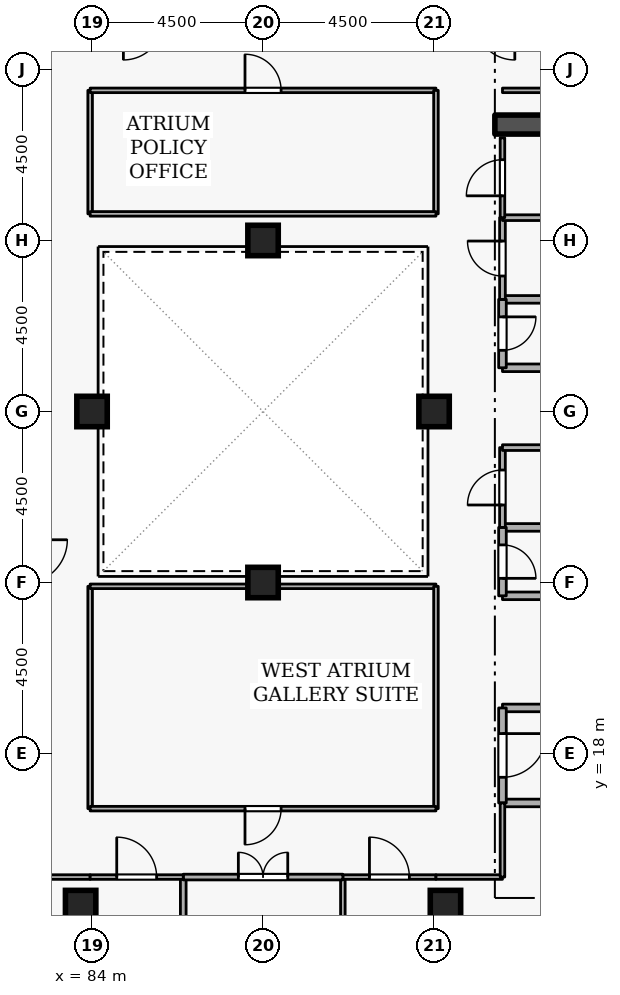
"""IFC4 building model, lengths in metres.
Left out: names, types, materials, properties, quantities, classifications, styles, units other than length and angle.
Written with IfcOpenShell. Run it as: python <this file> out.ifc"""

import sys

from ifc_helpers import new_model, si_unit, direction, frame, frame_2d, origin, origin_2d, place, context, subcontext, project, spatial, rectangle, extrude, element, fill, save


model = new_model("IFC4")
c1 = context("Model", 3, precision=1e-05, world=origin(), true_north=direction((0.0, 1.0)))
c2 = subcontext(c1, "Body", "Model", "MODEL_VIEW")
j1 = project(units=[si_unit("LENGTHUNIT", "METRE"), si_unit("PLANEANGLEUNIT", "RADIAN")], contexts=[c1])
p1 = place(None, origin())
s1 = spatial("IfcSite", under=j1, at=p1, CompositionType="ELEMENT")
p2 = place(p1, origin())
s2 = spatial("IfcBuilding", under=s1, at=p2, CompositionType="ELEMENT")
p3 = place(p2, frame((0.0, 0.0, 258.3)))
s3 = spatial("IfcBuildingStorey", under=s2, at=p3, CompositionType="ELEMENT", Elevation=258.3)
p4 = place(p3, frame((94.6, 34.55, 0.0), z_axis=(0.0, 0.0, 1.0), x_axis=(1.0, 0.0, 0.0)))
e1 = element("IfcWall", 1, at=p4, inside=s3, PredefinedType="SHEAR", context=c2, shape_type="SweptSolid", body=[
    extrude(rectangle(XDim=5.8, YDim=0.5, at=frame_2d((2.9, 0.0))), origin(), (0.0, 0.0, 1.0), 3.6),
])
for number, where, z_axis, x_axis in (
    (2, (93.3, 14.0, 0.0), (0.0, 0.0, 1.0), (1.0, 0.0, 0.0)),
    (3, (83.7, 14.0, 0.0), (0.0, 0.0, 1.0), (1.0, 0.0, 0.0)),
    (4, (93.0, 27.0, 0.0), (0.0, 0.0, 1.0), (1.0, 0.0, 0.0)),
    (5, (84.0, 27.0, 0.0), (0.0, 0.0, 1.0), (1.0, 0.0, 0.0)),
    (6, (88.5, 22.5, 0.0), (0.0, 0.0, 1.0), (1.0, 0.0, 0.0)),
    (7, (88.5, 31.5, 0.0), (0.0, 0.0, 1.0), (1.0, 0.0, 0.0)),
):
    element("IfcColumn", number, at=place(p3, frame(where, z_axis=z_axis, x_axis=x_axis)), inside=s3, PredefinedType="COLUMN", context=c2, shape_type="SweptSolid", body=[
        extrude(rectangle(XDim=0.8, YDim=0.8, at=origin_2d()), origin(), (0.0, 0.0, 1.0), 3.6),
    ])
p5 = place(p3, frame((94.8, 16.7, 0.0), z_axis=(0.0, 0.0, 1.0), x_axis=(1.0, 0.0, 0.0)))
e8 = element("IfcWall", 8, at=p5, inside=s3, PredefinedType="STANDARD", context=c2, shape_type="SweptSolid", body=[
    extrude(rectangle(XDim=5.7, YDim=0.2, at=frame_2d((2.85, 0.0))), origin(), (0.0, 0.0, 1.0), 3.34),
])
p6 = place(p3, frame((97.1, 19.2, 0.0), z_axis=(0.0, 0.0, 1.0), x_axis=(-1.0, 0.0, 0.0)))
e9 = element("IfcWall", 9, at=p6, inside=s3, PredefinedType="STANDARD", context=c2, shape_type="SweptSolid", body=[
    extrude(rectangle(XDim=2.3, YDim=0.2, at=frame_2d((1.15, 0.0))), origin(), (0.0, 0.0, 1.0), 2.545),
])
p7 = place(p3, frame((94.8, 19.2, 0.0), z_axis=(0.0, 0.0, 1.0), x_axis=(0.0, -1.0, 0.0)))
e10 = element("IfcWall", 10, at=p7, inside=s3, PredefinedType="STANDARD", context=c2, shape_type="SweptSolid", body=[
    extrude(rectangle(XDim=2.5, YDim=0.2, at=frame_2d((1.25, 0.0))), origin(), (0.0, 0.0, 1.0), 3.34),
])
p8 = place(p7, frame((0.675, 0.0, 0.0)))
e11 = element("IfcOpeningElement", 11, at=p8, cuts=e10, PredefinedType="OPENING", context=c2, shape_type="SweptSolid", body=[
    extrude(rectangle(XDim=1.15, YDim=2.1, at=frame_2d((0.575, 1.05))), frame((0.0, 0.11, 0.0), z_axis=(0.0, -1.0, 0.0), x_axis=(1.0, 0.0, 0.0)), (0.0, 0.0, 1.0), 0.22),
])
for number, where, z_axis, x_axis in (
    (12, (94.8, 28.15, 0.0), (0.0, 0.0, 1.0), (1.0, 0.0, 0.0)),
    (13, (96.85, 29.95, 0.0), (0.0, 0.0, 1.0), (-1.0, 0.0, 0.0)),
):
    element("IfcWall", number, at=place(p3, frame(where, z_axis=z_axis, x_axis=x_axis)), inside=s3, PredefinedType="STANDARD", context=c2, shape_type="SweptSolid", body=[
        extrude(rectangle(XDim=2.05, YDim=0.2, at=frame_2d((1.025, 0.0))), origin(), (0.0, 0.0, 1.0), 3.34),
    ])
p9 = place(p3, frame((94.8, 29.95, 0.0), z_axis=(0.0, 0.0, 1.0), x_axis=(0.0, -1.0, 0.0)))
e14 = element("IfcWall", 14, at=p9, inside=s3, PredefinedType="STANDARD", context=c2, shape_type="SweptSolid", body=[
    extrude(rectangle(XDim=1.8, YDim=0.2, at=frame_2d((0.9, 0.0))), origin(), (0.0, 0.0, 1.0), 3.34),
])
p10 = place(p9, frame((0.46, 0.0, 0.0)))
e15 = element("IfcOpeningElement", 15, at=p10, cuts=e14, PredefinedType="OPENING", context=c2, shape_type="SweptSolid", body=[
    extrude(rectangle(XDim=0.88, YDim=2.04, at=frame_2d((0.44, 1.02))), frame((0.0, 0.11, 0.0), z_axis=(0.0, -1.0, 0.0), x_axis=(1.0, 0.0, 0.0)), (0.0, 0.0, 1.0), 0.22),
])
for number, where, z_axis, x_axis in (
    (16, (94.8, 22.15, 0.0), (0.0, 0.0, 1.0), (1.0, 0.0, 0.0)),
    (17, (96.85, 23.95, 0.0), (0.0, 0.0, 1.0), (-1.0, 0.0, 0.0)),
):
    element("IfcWall", number, at=place(p3, frame(where, z_axis=z_axis, x_axis=x_axis)), inside=s3, PredefinedType="STANDARD", context=c2, shape_type="SweptSolid", body=[
        extrude(rectangle(XDim=2.05, YDim=0.2, at=frame_2d((1.025, 0.0))), origin(), (0.0, 0.0, 1.0), 3.34),
    ])
p11 = place(p3, frame((94.8, 23.95, 0.0), z_axis=(0.0, 0.0, 1.0), x_axis=(0.0, -1.0, 0.0)))
e18 = element("IfcWall", 18, at=p11, inside=s3, PredefinedType="STANDARD", context=c2, shape_type="SweptSolid", body=[
    extrude(rectangle(XDim=1.8, YDim=0.2, at=frame_2d((0.9, 0.0))), origin(), (0.0, 0.0, 1.0), 3.34),
])
p12 = place(p11, frame((0.46, 0.0, 0.0)))
e19 = element("IfcOpeningElement", 19, at=p12, cuts=e18, PredefinedType="OPENING", context=c2, shape_type="SweptSolid", body=[
    extrude(rectangle(XDim=0.88, YDim=2.04, at=frame_2d((0.44, 1.02))), frame((0.0, 0.11, 0.0), z_axis=(0.0, -1.0, 0.0), x_axis=(1.0, 0.0, 0.0)), (0.0, 0.0, 1.0), 0.22),
])
p13 = place(p3, frame((94.8, 23.95, 0.0), z_axis=(0.0, 0.0, 1.0), x_axis=(0.0, 1.0, 0.0)))
e20 = element("IfcWall", 20, at=p13, inside=s3, PredefinedType="PARTITIONING", context=c2, shape_type="SweptSolid", body=[
    extrude(rectangle(XDim=2.1, YDim=0.15, at=frame_2d((1.05, 0.0))), origin(), (0.0, 0.0, 1.0), 3.34),
])
p14 = place(p13, frame((0.59, 0.0, 0.0)))
e21 = element("IfcOpeningElement", 21, at=p14, cuts=e20, PredefinedType="OPENING", context=c2, shape_type="SweptSolid", body=[
    extrude(rectangle(XDim=0.92, YDim=2.08, at=frame_2d((0.46, 1.04))), frame((0.0, 0.085, 0.0), z_axis=(0.0, -1.0, 0.0), x_axis=(1.0, 0.0, 0.0)), (0.0, 0.0, 1.0), 0.17),
])
p15 = place(p3, frame((94.8, 26.05, 0.0), z_axis=(0.0, 0.0, 1.0), x_axis=(1.0, 0.0, 0.0)))
e22 = element("IfcWall", 22, at=p15, inside=s3, PredefinedType="PARTITIONING", context=c2, shape_type="SweptSolid", body=[
    extrude(rectangle(XDim=2.05, YDim=0.15, at=frame_2d((1.025, 0.0))), origin(), (0.0, 0.0, 1.0), 3.34),
])
p16 = place(p3, frame((94.8, 29.95, 0.0), z_axis=(0.0, 0.0, 1.0), x_axis=(0.0, 1.0, 0.0)))
e23 = element("IfcWall", 23, at=p16, inside=s3, PredefinedType="PARTITIONING", context=c2, shape_type="SweptSolid", body=[
    extrude(rectangle(XDim=2.15, YDim=0.15, at=frame_2d((1.075, 0.0))), origin(), (0.0, 0.0, 1.0), 3.34),
])
p17 = place(p16, frame((0.615, 0.0, 0.0)))
e24 = element("IfcOpeningElement", 24, at=p17, cuts=e23, PredefinedType="OPENING", context=c2, shape_type="SweptSolid", body=[
    extrude(rectangle(XDim=0.92, YDim=2.08, at=frame_2d((0.46, 1.04))), frame((0.0, 0.085, 0.0), z_axis=(0.0, -1.0, 0.0), x_axis=(1.0, 0.0, 0.0)), (0.0, 0.0, 1.0), 0.17),
])
p18 = place(p3, frame((94.8, 32.1, 0.0), z_axis=(0.0, 0.0, 1.0), x_axis=(1.0, 0.0, 0.0)))
e25 = element("IfcWall", 25, at=p18, inside=s3, PredefinedType="PARTITIONING", context=c2, shape_type="SweptSolid", body=[
    extrude(rectangle(XDim=2.05, YDim=0.15, at=frame_2d((1.025, 0.0))), origin(), (0.0, 0.0, 1.0), 3.34),
])
p19 = place(p3, frame((94.8, 32.1, 0.0), z_axis=(0.0, 0.0, 1.0), x_axis=(0.0, 1.0, 0.0)))
e26 = element("IfcWall", 26, at=p19, inside=s3, PredefinedType="PARTITIONING", context=c2, shape_type="SweptSolid", body=[
    extrude(rectangle(XDim=2.1, YDim=0.12, at=frame_2d((1.05, 0.0))), origin(), (0.0, 0.0, 1.0), 3.34),
])
p20 = place(p19, frame((0.575, 0.0, 0.0)))
e27 = element("IfcOpeningElement", 27, at=p20, cuts=e26, PredefinedType="OPENING", context=c2, shape_type="SweptSolid", body=[
    extrude(rectangle(XDim=0.95, YDim=2.1, at=frame_2d((0.475, 1.05))), frame((0.0, 0.07, 0.0), z_axis=(0.0, -1.0, 0.0), x_axis=(1.0, 0.0, 0.0)), (0.0, 0.0, 1.0), 0.14),
])
p21 = place(p3, frame((94.8, 35.45, 0.0), z_axis=(0.0, 0.0, 1.0), x_axis=(1.0, 0.0, 0.0)))
e28 = element("IfcWall", 28, at=p21, inside=s3, PredefinedType="PARTITIONING", context=c2, shape_type="SweptSolid", body=[
    extrude(rectangle(XDim=5.9, YDim=0.12, at=frame_2d((2.95, 0.0))), origin(), (0.0, 0.0, 1.0), 3.34),
])
p22 = place(p3, frame((90.6, 9.28, 0.0), z_axis=(0.0, 0.0, 1.0), x_axis=(0.0, 1.0, 0.0)))
e29 = element("IfcWall", 29, at=p22, inside=s3, PredefinedType="PARTITIONING", context=c2, shape_type="SweptSolid", body=[
    extrude(rectangle(XDim=5.47, YDim=0.12, at=frame_2d((2.735, 0.0))), origin(), (0.0, 0.0, 1.0), 3.34),
])
p23 = place(p3, frame((90.6, 14.75, 0.0), z_axis=(0.0, 0.0, 1.0), x_axis=(1.0, 0.0, 0.0)))
e30 = element("IfcWall", 30, at=p23, inside=s3, PredefinedType="PARTITIONING", context=c2, shape_type="SweptSolid", body=[
    extrude(rectangle(XDim=2.45, YDim=0.12, at=frame_2d((1.225, 0.0))), origin(), (0.0, 0.0, 1.0), 3.34),
])
p24 = place(p23, frame((0.7, 0.0, 0.0)))
e31 = element("IfcOpeningElement", 31, at=p24, cuts=e30, PredefinedType="OPENING", context=c2, shape_type="SweptSolid", body=[
    extrude(rectangle(XDim=1.05, YDim=2.1, at=frame_2d((0.525, 1.05))), frame((0.0, 0.07, 0.0), z_axis=(0.0, -1.0, 0.0), x_axis=(1.0, 0.0, 0.0)), (0.0, 0.0, 1.0), 0.14),
])
p25 = place(p3, frame((93.05, 14.75, 0.0), z_axis=(0.0, 0.0, 1.0), x_axis=(1.0, 0.0, 0.0)))
e32 = element("IfcWall", 32, at=p25, inside=s3, PredefinedType="PARTITIONING", context=c2, shape_type="SweptSolid", body=[
    extrude(rectangle(XDim=1.75, YDim=0.12, at=frame_2d((0.875, 0.0))), origin(), (0.0, 0.0, 1.0), 3.34),
])
p26 = place(p3, frame((94.8, 14.75, 0.0), z_axis=(0.0, 0.0, 1.0), x_axis=(0.0, 1.0, 0.0)))
e33 = element("IfcWall", 33, at=p26, inside=s3, PredefinedType="PARTITIONING", context=c2, shape_type="SweptSolid", body=[
    extrude(rectangle(XDim=1.95, YDim=0.12, at=frame_2d((0.975, 0.0))), origin(), (0.0, 0.0, 1.0), 3.34),
])
p27 = place(p3, frame((86.4, 9.28, 0.0), z_axis=(0.0, 0.0, 1.0), x_axis=(0.0, 1.0, 0.0)))
e34 = element("IfcWall", 34, at=p27, inside=s3, PredefinedType="PARTITIONING", context=c2, shape_type="SweptSolid", body=[
    extrude(rectangle(XDim=5.47, YDim=0.15, at=frame_2d((2.735, 0.0))), origin(), (0.0, 0.0, 1.0), 3.34),
])
p28 = place(p3, frame((86.4, 14.75, 0.0), z_axis=(0.0, 0.0, 1.0), x_axis=(1.0, 0.0, 0.0)))
e35 = element("IfcWall", 35, at=p28, inside=s3, PredefinedType="PARTITIONING", context=c2, shape_type="SweptSolid", body=[
    extrude(rectangle(XDim=4.2, YDim=0.15, at=frame_2d((2.1, 0.0))), origin(), (0.0, 0.0, 1.0), 3.34),
])
p29 = place(p28, frame((1.45, 0.0, 0.0)))
e36 = element("IfcOpeningElement", 36, at=p29, cuts=e35, PredefinedType="OPENING", context=c2, shape_type="SweptSolid", body=[
    extrude(rectangle(XDim=1.3, YDim=2.12, at=frame_2d((0.65, 1.06))), frame((0.0, 0.085, 0.0), z_axis=(0.0, -1.0, 0.0), x_axis=(1.0, 0.0, 0.0)), (0.0, 0.0, 1.0), 0.17),
])
p30 = place(p3, frame((82.2, 14.75, 0.0), z_axis=(0.0, 0.0, 1.0), x_axis=(1.0, 0.0, 0.0)))
e37 = element("IfcWall", 37, at=p30, inside=s3, PredefinedType="PARTITIONING", context=c2, shape_type="SweptSolid", body=[
    extrude(rectangle(XDim=1.75, YDim=0.12, at=frame_2d((0.875, 0.0))), origin(), (0.0, 0.0, 1.0), 3.34),
])
p31 = place(p3, frame((83.95, 14.75, 0.0), z_axis=(0.0, 0.0, 1.0), x_axis=(1.0, 0.0, 0.0)))
e38 = element("IfcWall", 38, at=p31, inside=s3, PredefinedType="PARTITIONING", context=c2, shape_type="SweptSolid", body=[
    extrude(rectangle(XDim=2.45, YDim=0.12, at=frame_2d((1.225, 0.0))), origin(), (0.0, 0.0, 1.0), 3.34),
])
p32 = place(p31, frame((0.7, 0.0, 0.0)))
e39 = element("IfcOpeningElement", 39, at=p32, cuts=e38, PredefinedType="OPENING", context=c2, shape_type="SweptSolid", body=[
    extrude(rectangle(XDim=1.05, YDim=2.1, at=frame_2d((0.525, 1.05))), frame((0.0, 0.07, 0.0), z_axis=(0.0, -1.0, 0.0), x_axis=(1.0, 0.0, 0.0)), (0.0, 0.0, 1.0), 0.14),
])
p33 = place(p3, frame((83.95, 16.55, 0.0), z_axis=(0.0, 0.0, 1.0), x_axis=(0.0, 1.0, 0.0)))
e40 = element("IfcWall", 40, at=p33, inside=s3, PredefinedType="PARTITIONING", context=c2, shape_type="SweptSolid", body=[
    extrude(rectangle(XDim=5.85, YDim=0.12, at=frame_2d((2.925, 0.0))), origin(), (0.0, 0.0, 1.0), 3.34),
])
p34 = place(p3, frame((83.95, 22.4, 0.0), z_axis=(0.0, 0.0, 1.0), x_axis=(1.0, 0.0, 0.0)))
e41 = element("IfcWall", 41, at=p34, inside=s3, PredefinedType="PARTITIONING", context=c2, shape_type="SweptSolid", body=[
    extrude(rectangle(XDim=9.1, YDim=0.12, at=frame_2d((4.55, 0.0))), origin(), (0.0, 0.0, 1.0), 3.34),
])
p35 = place(p3, frame((93.05, 22.4, 0.0), z_axis=(0.0, 0.0, 1.0), x_axis=(0.0, -1.0, 0.0)))
e42 = element("IfcWall", 42, at=p35, inside=s3, PredefinedType="PARTITIONING", context=c2, shape_type="SweptSolid", body=[
    extrude(rectangle(XDim=5.85, YDim=0.12, at=frame_2d((2.925, 0.0))), origin(), (0.0, 0.0, 1.0), 3.34),
])
p36 = place(p3, frame((93.05, 16.55, 0.0), z_axis=(0.0, 0.0, 1.0), x_axis=(-1.0, 0.0, 0.0)))
e43 = element("IfcWall", 43, at=p36, inside=s3, PredefinedType="PARTITIONING", context=c2, shape_type="SweptSolid", body=[
    extrude(rectangle(XDim=9.1, YDim=0.12, at=frame_2d((4.55, 0.0))), origin(), (0.0, 0.0, 1.0), 3.34),
])
p37 = place(p36, frame((4.075, 0.0, 0.0)))
e44 = element("IfcOpeningElement", 44, at=p37, cuts=e43, PredefinedType="OPENING", context=c2, shape_type="SweptSolid", body=[
    extrude(rectangle(XDim=0.95, YDim=2.1, at=frame_2d((0.475, 1.05))), frame((0.0, 0.07, 0.0), z_axis=(0.0, -1.0, 0.0), x_axis=(1.0, 0.0, 0.0)), (0.0, 0.0, 1.0), 0.14),
])
p38 = place(p3, frame((83.95, 32.2, 0.0), z_axis=(0.0, 0.0, 1.0), x_axis=(0.0, 1.0, 0.0)))
e45 = element("IfcWall", 45, at=p38, inside=s3, PredefinedType="PARTITIONING", context=c2, shape_type="SweptSolid", body=[
    extrude(rectangle(XDim=3.25, YDim=0.12, at=frame_2d((1.625, 0.0))), origin(), (0.0, 0.0, 1.0), 3.34),
])
p39 = place(p3, frame((83.95, 35.45, 0.0), z_axis=(0.0, 0.0, 1.0), x_axis=(1.0, 0.0, 0.0)))
e46 = element("IfcWall", 46, at=p39, inside=s3, PredefinedType="PARTITIONING", context=c2, shape_type="SweptSolid", body=[
    extrude(rectangle(XDim=9.1, YDim=0.12, at=frame_2d((4.55, 0.0))), origin(), (0.0, 0.0, 1.0), 3.34),
])
p40 = place(p39, frame((4.075, 0.0, 0.0)))
e47 = element("IfcOpeningElement", 47, at=p40, cuts=e46, PredefinedType="OPENING", context=c2, shape_type="SweptSolid", body=[
    extrude(rectangle(XDim=0.95, YDim=2.1, at=frame_2d((0.475, 1.05))), frame((0.0, 0.07, 0.0), z_axis=(0.0, -1.0, 0.0), x_axis=(1.0, 0.0, 0.0)), (0.0, 0.0, 1.0), 0.14),
])
p41 = place(p3, frame((93.05, 35.45, 0.0), z_axis=(0.0, 0.0, 1.0), x_axis=(0.0, -1.0, 0.0)))
e48 = element("IfcWall", 48, at=p41, inside=s3, PredefinedType="PARTITIONING", context=c2, shape_type="SweptSolid", body=[
    extrude(rectangle(XDim=3.25, YDim=0.12, at=frame_2d((1.625, 0.0))), origin(), (0.0, 0.0, 1.0), 3.34),
])
p42 = place(p3, frame((93.05, 32.2, 0.0), z_axis=(0.0, 0.0, 1.0), x_axis=(-1.0, 0.0, 0.0)))
e49 = element("IfcWall", 49, at=p42, inside=s3, PredefinedType="PARTITIONING", context=c2, shape_type="SweptSolid", body=[
    extrude(rectangle(XDim=9.1, YDim=0.12, at=frame_2d((4.55, 0.0))), origin(), (0.0, 0.0, 1.0), 3.34),
])
p43 = place(p8, origin())
e50 = element("IfcDoor", 50, at=p43, inside=s3, OperationType="SINGLE_SWING_LEFT", PredefinedType="DOOR", context=c2, shape_type="SweptSolid", body=[
    extrude(rectangle(XDim=1.15, YDim=2.1, at=frame_2d((0.575, 1.05))), frame((0.0, 0.025, 0.0), z_axis=(0.0, -1.0, 0.0), x_axis=(1.0, 0.0, 0.0)), (0.0, 0.0, 1.0), 0.05),
])
fill(e11, e50)
p44 = place(p10, origin())
e51 = element("IfcDoor", 51, at=p44, inside=s3, OperationType="SINGLE_SWING_LEFT", PredefinedType="DOOR", context=c2, shape_type="SweptSolid", body=[
    extrude(rectangle(XDim=0.88, YDim=2.04, at=frame_2d((0.44, 1.02))), frame((0.0, 0.025, 0.0), z_axis=(0.0, -1.0, 0.0), x_axis=(1.0, 0.0, 0.0)), (0.0, 0.0, 1.0), 0.05),
])
fill(e15, e51)
p45 = place(p12, origin())
e52 = element("IfcDoor", 52, at=p45, inside=s3, OperationType="SINGLE_SWING_RIGHT", PredefinedType="DOOR", context=c2, shape_type="SweptSolid", body=[
    extrude(rectangle(XDim=0.88, YDim=2.04, at=frame_2d((0.44, 1.02))), frame((0.0, 0.025, 0.0), z_axis=(0.0, -1.0, 0.0), x_axis=(1.0, 0.0, 0.0)), (0.0, 0.0, 1.0), 0.05),
])
fill(e19, e52)
p46 = place(p14, origin())
e53 = element("IfcDoor", 53, at=p46, inside=s3, OperationType="SINGLE_SWING_LEFT", PredefinedType="DOOR", context=c2, shape_type="SweptSolid", body=[
    extrude(rectangle(XDim=0.92, YDim=2.08, at=frame_2d((0.46, 1.04))), frame((0.0, 0.025, 0.0), z_axis=(0.0, -1.0, 0.0), x_axis=(1.0, 0.0, 0.0)), (0.0, 0.0, 1.0), 0.05),
])
fill(e21, e53)
p47 = place(p17, origin())
e54 = element("IfcDoor", 54, at=p47, inside=s3, OperationType="SINGLE_SWING_RIGHT", PredefinedType="DOOR", context=c2, shape_type="SweptSolid", body=[
    extrude(rectangle(XDim=0.92, YDim=2.08, at=frame_2d((0.46, 1.04))), frame((0.0, 0.025, 0.0), z_axis=(0.0, -1.0, 0.0), x_axis=(1.0, 0.0, 0.0)), (0.0, 0.0, 1.0), 0.05),
])
fill(e24, e54)
p48 = place(p20, origin())
e55 = element("IfcDoor", 55, at=p48, inside=s3, OperationType="SINGLE_SWING_LEFT", PredefinedType="DOOR", context=c2, shape_type="SweptSolid", body=[
    extrude(rectangle(XDim=0.95, YDim=2.1, at=frame_2d((0.475, 1.05))), frame((0.0, 0.025, 0.0), z_axis=(0.0, -1.0, 0.0), x_axis=(1.0, 0.0, 0.0)), (0.0, 0.0, 1.0), 0.05),
])
fill(e27, e55)
p49 = place(p24, origin())
e56 = element("IfcDoor", 56, at=p49, inside=s3, OperationType="SINGLE_SWING_LEFT", PredefinedType="DOOR", context=c2, shape_type="SweptSolid", body=[
    extrude(rectangle(XDim=1.05, YDim=2.1, at=frame_2d((0.525, 1.05))), frame((0.0, 0.025, 0.0), z_axis=(0.0, -1.0, 0.0), x_axis=(1.0, 0.0, 0.0)), (0.0, 0.0, 1.0), 0.05),
])
fill(e31, e56)
p50 = place(p29, origin())
e57 = element("IfcDoor", 57, at=p50, inside=s3, OperationType="DOUBLE_DOOR_SINGLE_SWING", PredefinedType="DOOR", context=c2, shape_type="SweptSolid", body=[
    extrude(rectangle(XDim=1.3, YDim=2.12, at=frame_2d((0.65, 1.06))), frame((0.0, 0.025, 0.0), z_axis=(0.0, -1.0, 0.0), x_axis=(1.0, 0.0, 0.0)), (0.0, 0.0, 1.0), 0.05),
])
fill(e36, e57)
p51 = place(p32, origin())
e58 = element("IfcDoor", 58, at=p51, inside=s3, OperationType="SINGLE_SWING_LEFT", PredefinedType="DOOR", context=c2, shape_type="SweptSolid", body=[
    extrude(rectangle(XDim=1.05, YDim=2.1, at=frame_2d((0.525, 1.05))), frame((0.0, 0.025, 0.0), z_axis=(0.0, -1.0, 0.0), x_axis=(1.0, 0.0, 0.0)), (0.0, 0.0, 1.0), 0.05),
])
fill(e39, e58)
p52 = place(p37, origin())
e59 = element("IfcDoor", 59, at=p52, inside=s3, OperationType="SINGLE_SWING_RIGHT", PredefinedType="DOOR", context=c2, shape_type="SweptSolid", body=[
    extrude(rectangle(XDim=0.95, YDim=2.1, at=frame_2d((0.475, 1.05))), frame((0.0, 0.025, 0.0), z_axis=(0.0, -1.0, 0.0), x_axis=(1.0, 0.0, 0.0)), (0.0, 0.0, 1.0), 0.05),
])
fill(e44, e59)
p53 = place(p40, origin())
e60 = element("IfcDoor", 60, at=p53, inside=s3, OperationType="SINGLE_SWING_LEFT", PredefinedType="DOOR", context=c2, shape_type="SweptSolid", body=[
    extrude(rectangle(XDim=0.95, YDim=2.1, at=frame_2d((0.475, 1.05))), frame((0.0, 0.025, 0.0), z_axis=(0.0, -1.0, 0.0), x_axis=(1.0, 0.0, 0.0)), (0.0, 0.0, 1.0), 0.05),
])
fill(e47, e60)
save(model, sys.argv[1])
